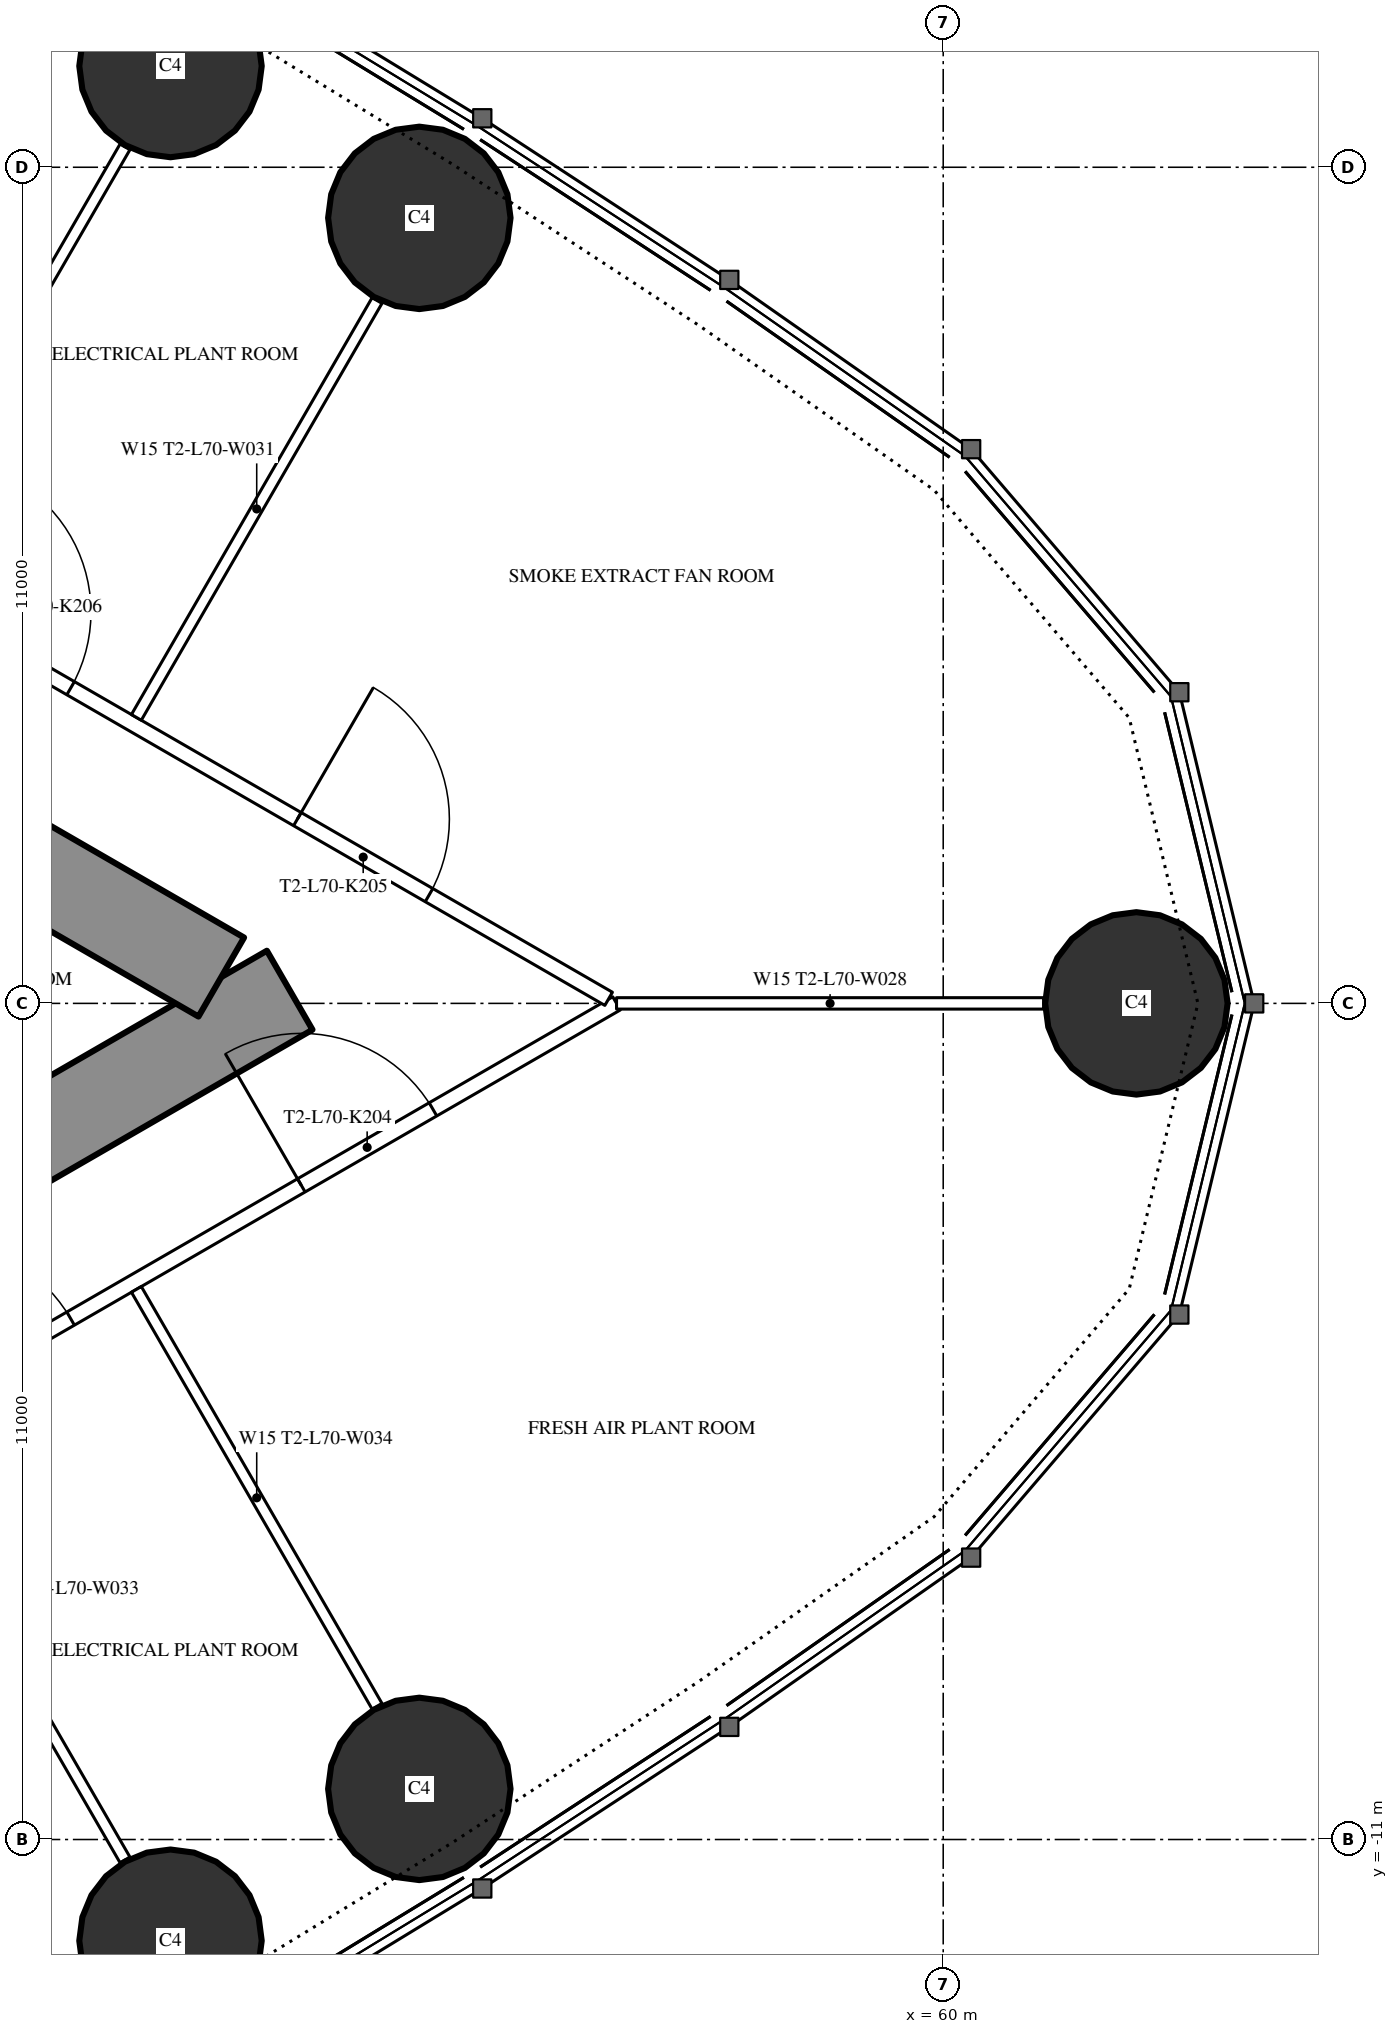
"""IFC4 building model, lengths in metres.
Left out: names, types, materials, properties, quantities, classifications, styles, units other than length and angle.
Written with IfcOpenShell. Run it as: python <this file> out.ifc"""

import sys

from ifc_helpers import new_model, si_unit, direction, frame, frame_2d, origin, origin_2d, place, context, subcontext, project, spatial, rectangle, circle, extrude, element, fill, save


model = new_model("IFC4")
c1 = context("Model", 3, precision=1e-05, world=origin(), true_north=direction((0.0, 1.0)))
c2 = subcontext(c1, "Body", "Model", "MODEL_VIEW")
j1 = project(units=[si_unit("LENGTHUNIT", "METRE"), si_unit("PLANEANGLEUNIT", "RADIAN")], contexts=[c1])
p1 = place(None, origin())
s1 = spatial("IfcSite", under=j1, at=p1, CompositionType="ELEMENT")
p2 = place(p1, origin())
s2 = spatial("IfcBuilding", under=s1, at=p2, CompositionType="ELEMENT")
p3 = place(p2, frame((0.0, 0.0, 268.3)))
s3 = spatial("IfcBuildingStorey", under=s2, at=p3, CompositionType="ELEMENT", Elevation=268.3)
for number, where, z_axis, x_axis in (
    (1, (62.542, 0.0, 0.0), (0.0, 0.0, 1.0), (1.0, 0.0, 0.0)),
    (2, (53.108, 10.334, 0.0), (0.0, 0.0, 1.0), (1.0, 0.0, 0.0)),
    (3, (49.834, 12.332, 0.0), (0.0, 0.0, 1.0), (1.0, 0.0, 0.0)),
    (4, (49.834, -12.332, 0.0), (0.0, 0.0, 1.0), (1.0, 0.0, 0.0)),
    (5, (53.108, -10.334, 0.0), (0.0, 0.0, 1.0), (1.0, 0.0, 0.0)),
):
    element("IfcColumn", number, at=place(p3, frame(where, z_axis=z_axis, x_axis=x_axis)), inside=s3, PredefinedType="COLUMN", context=c2, shape_type="SweptSolid", body=[
        extrude(circle(Radius=1.2, at=origin_2d()), origin(), (0.0, 0.0, 1.0), 5.0),
    ])
p4 = place(p3, frame((27.2, -13.8, 0.0), z_axis=(0.0, 0.0, 1.0), x_axis=(0.866027159892, 0.499996958321, 0.0)))
e6 = element("IfcWall", 6, at=p4, inside=s3, PredefinedType="SHEAR", context=c2, shape_type="SweptSolid", body=[
    extrude(rectangle(XDim=27.947, YDim=1.2, at=frame_2d((13.973, 0.0))), origin(), (0.0, 0.0, 1.0), 5.0),
])
p5 = place(p4, frame((4.6, 0.0, 0.0)))
e7 = element("IfcOpeningElement", 7, at=p5, cuts=e6, PredefinedType="OPENING", context=c2, shape_type="SweptSolid", body=[
    extrude(rectangle(XDim=1.0, YDim=2.2, at=frame_2d((0.5, 1.1))), frame((0.0, 0.61, 0.0), z_axis=(0.0, -1.0, 0.0), x_axis=(1.0, 0.0, 0.0)), (0.0, 0.0, 1.0), 1.22),
])
p6 = place(p4, frame((13.395, 0.0, 0.0)))
e8 = element("IfcOpeningElement", 8, at=p6, cuts=e6, PredefinedType="OPENING", context=c2, shape_type="SweptSolid", body=[
    extrude(rectangle(XDim=1.8, YDim=2.2, at=frame_2d((0.9, 1.1))), frame((0.0, 0.61, 0.0), z_axis=(0.0, -1.0, 0.0), x_axis=(1.0, 0.0, 0.0)), (0.0, 0.0, 1.0), 1.22),
])
p7 = place(p3, frame((27.2, 13.8, 0.0), z_axis=(0.0, 0.0, 1.0), x_axis=(0.866024515034, -0.500001539357, 0.0)))
e9 = element("IfcWall", 9, at=p7, inside=s3, PredefinedType="SHEAR", context=c2, shape_type="SweptSolid", body=[
    extrude(rectangle(XDim=26.907, YDim=1.2, at=frame_2d((13.454, 0.0))), origin(), (0.0, 0.0, 1.0), 5.0),
])
p8 = place(p7, frame((4.6, 0.0, 0.0)))
e10 = element("IfcOpeningElement", 10, at=p8, cuts=e9, PredefinedType="OPENING", context=c2, shape_type="SweptSolid", body=[
    extrude(rectangle(XDim=1.0, YDim=2.2, at=frame_2d((0.5, 1.1))), frame((0.0, 0.61, 0.0), z_axis=(0.0, -1.0, 0.0), x_axis=(1.0, 0.0, 0.0)), (0.0, 0.0, 1.0), 1.22),
])
p9 = place(p7, frame((13.395, 0.0, 0.0)))
e11 = element("IfcOpeningElement", 11, at=p9, cuts=e9, PredefinedType="OPENING", context=c2, shape_type="SweptSolid", body=[
    extrude(rectangle(XDim=1.8, YDim=2.2, at=frame_2d((0.9, 1.1))), frame((0.0, 0.61, 0.0), z_axis=(0.0, -1.0, 0.0), x_axis=(1.0, 0.0, 0.0)), (0.0, 0.0, 1.0), 1.22),
])
p10 = place(p3, frame((28.959, -15.44, 0.0), z_axis=(0.0, 0.0, 1.0), x_axis=(0.866025227435, 0.500000305447, 0.0)))
e12 = element("IfcWall", 12, at=p10, inside=s3, PredefinedType="PARTITIONING", context=c2, shape_type="SweptSolid", body=[
    extrude(rectangle(XDim=30.88, YDim=0.2, at=frame_2d((15.44, 0.0))), origin(), (0.0, 0.0, 1.0), 4.7),
])
p11 = place(p10, frame((6.994, 0.0, 0.0)))
e13 = element("IfcOpeningElement", 13, at=p11, cuts=e12, PredefinedType="OPENING", context=c2, shape_type="SweptSolid", body=[
    extrude(rectangle(XDim=2.0, YDim=2.4, at=frame_2d((1.0, 1.2))), frame((0.0, 0.11, 0.0), z_axis=(0.0, -1.0, 0.0), x_axis=(1.0, 0.0, 0.0)), (0.0, 0.0, 1.0), 0.22),
])
p12 = place(p10, frame((16.704, 0.0, 0.0)))
e14 = element("IfcOpeningElement", 14, at=p12, cuts=e12, PredefinedType="OPENING", context=c2, shape_type="SweptSolid", body=[
    extrude(rectangle(XDim=2.0, YDim=2.4, at=frame_2d((1.0, 1.2))), frame((0.0, 0.11, 0.0), z_axis=(0.0, -1.0, 0.0), x_axis=(1.0, 0.0, 0.0)), (0.0, 0.0, 1.0), 0.22),
])
p13 = place(p10, frame((20.587, 0.0, 0.0)))
e15 = element("IfcOpeningElement", 15, at=p13, cuts=e12, PredefinedType="OPENING", context=c2, shape_type="SweptSolid", body=[
    extrude(rectangle(XDim=2.0, YDim=2.4, at=frame_2d((1.0, 1.2))), frame((0.0, 0.11, 0.0), z_axis=(0.0, -1.0, 0.0), x_axis=(1.0, 0.0, 0.0)), (0.0, 0.0, 1.0), 0.22),
])
p14 = place(p10, frame((26.092, 0.0, 0.0)))
e16 = element("IfcOpeningElement", 16, at=p14, cuts=e12, PredefinedType="OPENING", context=c2, shape_type="SweptSolid", body=[
    extrude(rectangle(XDim=2.0, YDim=2.4, at=frame_2d((1.0, 1.2))), frame((0.0, 0.11, 0.0), z_axis=(0.0, -1.0, 0.0), x_axis=(1.0, 0.0, 0.0)), (0.0, 0.0, 1.0), 0.22),
])
p15 = place(p3, frame((28.959, 15.44, 0.0), z_axis=(0.0, 0.0, 1.0), x_axis=(0.866027378611, -0.499996579484, 0.0)))
e17 = element("IfcWall", 17, at=p15, inside=s3, PredefinedType="PARTITIONING", context=c2, shape_type="SweptSolid", body=[
    extrude(rectangle(XDim=30.76, YDim=0.2, at=frame_2d((15.38, 0.0))), origin(), (0.0, 0.0, 1.0), 4.7),
])
p16 = place(p15, frame((26.032, 0.0, 0.0)))
e18 = element("IfcOpeningElement", 18, at=p16, cuts=e17, PredefinedType="OPENING", context=c2, shape_type="SweptSolid", body=[
    extrude(rectangle(XDim=2.0, YDim=2.4, at=frame_2d((1.0, 1.2))), frame((0.0, 0.11, 0.0), z_axis=(0.0, -1.0, 0.0), x_axis=(1.0, 0.0, 0.0)), (0.0, 0.0, 1.0), 0.22),
])
p17 = place(p15, frame((20.587, 0.0, 0.0)))
e19 = element("IfcOpeningElement", 19, at=p17, cuts=e17, PredefinedType="OPENING", context=c2, shape_type="SweptSolid", body=[
    extrude(rectangle(XDim=2.0, YDim=2.4, at=frame_2d((1.0, 1.2))), frame((0.0, 0.11, 0.0), z_axis=(0.0, -1.0, 0.0), x_axis=(1.0, 0.0, 0.0)), (0.0, 0.0, 1.0), 0.22),
])
p18 = place(p15, frame((16.704, 0.0, 0.0)))
e20 = element("IfcOpeningElement", 20, at=p18, cuts=e17, PredefinedType="OPENING", context=c2, shape_type="SweptSolid", body=[
    extrude(rectangle(XDim=2.0, YDim=2.4, at=frame_2d((1.0, 1.2))), frame((0.0, 0.11, 0.0), z_axis=(0.0, -1.0, 0.0), x_axis=(1.0, 0.0, 0.0)), (0.0, 0.0, 1.0), 0.22),
])
p19 = place(p15, frame((6.994, 0.0, 0.0)))
e21 = element("IfcOpeningElement", 21, at=p19, cuts=e17, PredefinedType="OPENING", context=c2, shape_type="SweptSolid", body=[
    extrude(rectangle(XDim=2.0, YDim=2.4, at=frame_2d((1.0, 1.2))), frame((0.0, 0.11, 0.0), z_axis=(0.0, -1.0, 0.0), x_axis=(1.0, 0.0, 0.0)), (0.0, 0.0, 1.0), 0.22),
])
p20 = place(p3, frame((46.023, -5.704, 0.0), z_axis=(0.0, 0.0, 1.0), x_axis=(0.499984478165, -0.866034365135, 0.0)))
e22 = element("IfcWall", 22, at=p20, inside=s3, PredefinedType="PARTITIONING", context=c2, shape_type="SweptSolid", body=[
    extrude(rectangle(XDim=6.426, YDim=0.15, at=frame_2d((3.213, 0.0))), origin(), (0.0, 0.0, 1.0), 3.8),
])
p21 = place(p3, frame((49.385, -3.763, 0.0), z_axis=(0.0, 0.0, 1.0), x_axis=(0.499999447814, -0.866025722589, 0.0)))
e23 = element("IfcWall", 23, at=p21, inside=s3, PredefinedType="PARTITIONING", context=c2, shape_type="SweptSolid", body=[
    extrude(rectangle(XDim=6.333, YDim=0.15, at=frame_2d((3.166, 0.0))), origin(), (0.0, 0.0, 1.0), 3.8),
])
p22 = place(p3, frame((46.023, 5.704, 0.0), z_axis=(0.0, 0.0, 1.0), x_axis=(0.499984478165, 0.866034365135, 0.0)))
e24 = element("IfcWall", 24, at=p22, inside=s3, PredefinedType="PARTITIONING", context=c2, shape_type="SweptSolid", body=[
    extrude(rectangle(XDim=6.426, YDim=0.15, at=frame_2d((3.213, 0.0))), origin(), (0.0, 0.0, 1.0), 3.8),
])
p23 = place(p3, frame((49.385, 3.763, 0.0), z_axis=(0.0, 0.0, 1.0), x_axis=(0.499999447814, 0.866025722589, 0.0)))
e25 = element("IfcWall", 25, at=p23, inside=s3, PredefinedType="PARTITIONING", context=c2, shape_type="SweptSolid", body=[
    extrude(rectangle(XDim=6.333, YDim=0.15, at=frame_2d((3.166, 0.0))), origin(), (0.0, 0.0, 1.0), 3.8),
])
p24 = place(p3, frame((55.702, 0.0, 0.0), z_axis=(0.0, 0.0, 1.0), x_axis=(1.0, 0.0, 0.0)))
e26 = element("IfcWall", 26, at=p24, inside=s3, PredefinedType="PARTITIONING", context=c2, shape_type="SweptSolid", body=[
    extrude(rectangle(XDim=5.619, YDim=0.15, at=frame_2d((2.81, 0.0))), origin(), (0.0, 0.0, 1.0), 3.8),
])
p25 = place(p13, origin())
e27 = element("IfcDoor", 27, at=p25, inside=s3, OperationType="DOUBLE_DOOR_SINGLE_SWING", PredefinedType="DOOR", context=c2, shape_type="SweptSolid", body=[
    extrude(rectangle(XDim=2.0, YDim=2.4, at=frame_2d((1.0, 1.2))), frame((0.0, 0.025, 0.0), z_axis=(0.0, -1.0, 0.0), x_axis=(1.0, 0.0, 0.0)), (0.0, 0.0, 1.0), 0.05),
])
fill(e15, e27)
p26 = place(p14, origin())
e28 = element("IfcDoor", 28, at=p26, inside=s3, OperationType="DOUBLE_DOOR_SINGLE_SWING", PredefinedType="DOOR", context=c2, shape_type="SweptSolid", body=[
    extrude(rectangle(XDim=2.0, YDim=2.4, at=frame_2d((1.0, 1.2))), frame((0.0, 0.025, 0.0), z_axis=(0.0, -1.0, 0.0), x_axis=(1.0, 0.0, 0.0)), (0.0, 0.0, 1.0), 0.05),
])
fill(e16, e28)
p27 = place(p16, origin())
e29 = element("IfcDoor", 29, at=p27, inside=s3, OperationType="DOUBLE_DOOR_SINGLE_SWING", PredefinedType="DOOR", context=c2, shape_type="SweptSolid", body=[
    extrude(rectangle(XDim=2.0, YDim=2.4, at=frame_2d((1.0, 1.2))), frame((0.0, 0.025, 0.0), z_axis=(0.0, -1.0, 0.0), x_axis=(1.0, 0.0, 0.0)), (0.0, 0.0, 1.0), 0.05),
])
fill(e18, e29)
p28 = place(p17, origin())
e30 = element("IfcDoor", 30, at=p28, inside=s3, OperationType="DOUBLE_DOOR_SINGLE_SWING", PredefinedType="DOOR", context=c2, shape_type="SweptSolid", body=[
    extrude(rectangle(XDim=2.0, YDim=2.4, at=frame_2d((1.0, 1.2))), frame((0.0, 0.025, 0.0), z_axis=(0.0, -1.0, 0.0), x_axis=(1.0, 0.0, 0.0)), (0.0, 0.0, 1.0), 0.05),
])
fill(e19, e30)
save(model, sys.argv[1])
